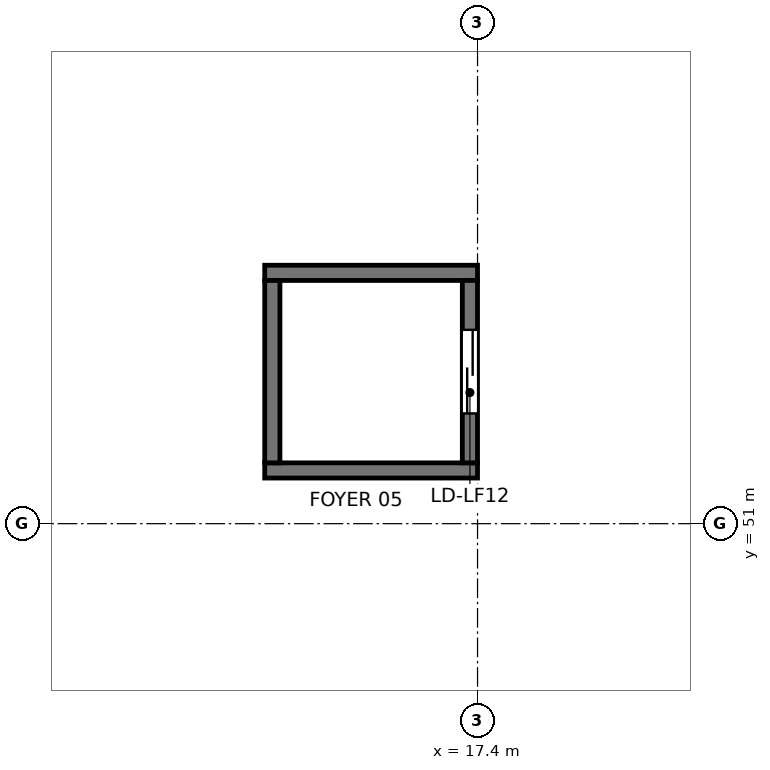
"""IFC4 building model, lengths in metres.
Left out: names, types, materials, properties, quantities, classifications, styles, units other than length and angle.
Written with IfcOpenShell. Run it as: python <this file> out.ifc"""

import sys

from ifc_helpers import new_model, si_unit, direction, frame, frame_2d, origin, place, context, subcontext, project, spatial, rectangle, extrude, element, fill, save


model = new_model("IFC4")
c1 = context("Model", 3, precision=1e-05, world=origin(), true_north=direction((0.0, 1.0)))
c2 = subcontext(c1, "Body", "Model", "MODEL_VIEW")
j1 = project(units=[si_unit("LENGTHUNIT", "METRE"), si_unit("PLANEANGLEUNIT", "RADIAN")], contexts=[c1])
p1 = place(None, origin())
s1 = spatial("IfcSite", under=j1, at=p1, CompositionType="ELEMENT")
p2 = place(p1, origin())
s2 = spatial("IfcBuilding", under=s1, at=p2, CompositionType="ELEMENT")
p3 = place(p2, frame((0.0, 0.0, 4.8)))
s3 = spatial("IfcBuildingStorey", under=s2, at=p3, CompositionType="ELEMENT", Elevation=4.8)
for number, where, z_axis, x_axis in (
    (1, (14.6, 51.7, 0.0), (0.0, 0.0, 1.0), (1.0, 0.0, 0.0)),
    (2, (14.6, 54.3, 0.0), (0.0, 0.0, 1.0), (1.0, 0.0, 0.0)),
):
    element("IfcWall", number, at=place(p3, frame(where, z_axis=z_axis, x_axis=x_axis)), inside=s3, PredefinedType="SOLIDWALL", context=c2, shape_type="SweptSolid", body=[
        extrude(rectangle(XDim=2.8, YDim=0.2, at=frame_2d((1.4, 0.0))), origin(), (0.0, 0.0, 1.0), 4.8),
    ])
p4 = place(p3, frame((14.7, 51.8, 0.0), z_axis=(0.0, 0.0, 1.0), x_axis=(0.0, 1.0, 0.0)))
e3 = element("IfcWall", 3, at=p4, inside=s3, PredefinedType="SOLIDWALL", context=c2, shape_type="SweptSolid", body=[
    extrude(rectangle(XDim=2.4, YDim=0.2, at=frame_2d((1.2, 0.0))), origin(), (0.0, 0.0, 1.0), 4.8),
])
p5 = place(p3, frame((17.3, 51.8, 0.0), z_axis=(0.0, 0.0, 1.0), x_axis=(0.0, 1.0, 0.0)))
e4 = element("IfcWall", 4, at=p5, inside=s3, PredefinedType="SOLIDWALL", context=c2, shape_type="SweptSolid", body=[
    extrude(rectangle(XDim=2.4, YDim=0.2, at=frame_2d((1.2, 0.0))), origin(), (0.0, 0.0, 1.0), 4.8),
])
p6 = place(p5, frame((0.65, 0.0, 0.0)))
e5 = element("IfcOpeningElement", 5, at=p6, cuts=e4, PredefinedType="OPENING", context=c2, shape_type="SweptSolid", body=[
    extrude(rectangle(XDim=1.1, YDim=2.1, at=frame_2d((0.55, 1.05))), frame((0.0, 0.11, 0.0), z_axis=(0.0, -1.0, 0.0), x_axis=(1.0, 0.0, 0.0)), (0.0, 0.0, 1.0), 0.22),
])
p7 = place(p6, origin())
e6 = element("IfcDoor", 6, at=p7, inside=s3, OperationType="SLIDING_TO_LEFT", PredefinedType="DOOR", context=c2, shape_type="SweptSolid", body=[
    extrude(rectangle(XDim=1.1, YDim=2.1, at=frame_2d((0.55, 1.05))), frame((0.0, 0.025, 0.0), z_axis=(0.0, -1.0, 0.0), x_axis=(1.0, 0.0, 0.0)), (0.0, 0.0, 1.0), 0.05),
])
fill(e5, e6)
save(model, sys.argv[1])
